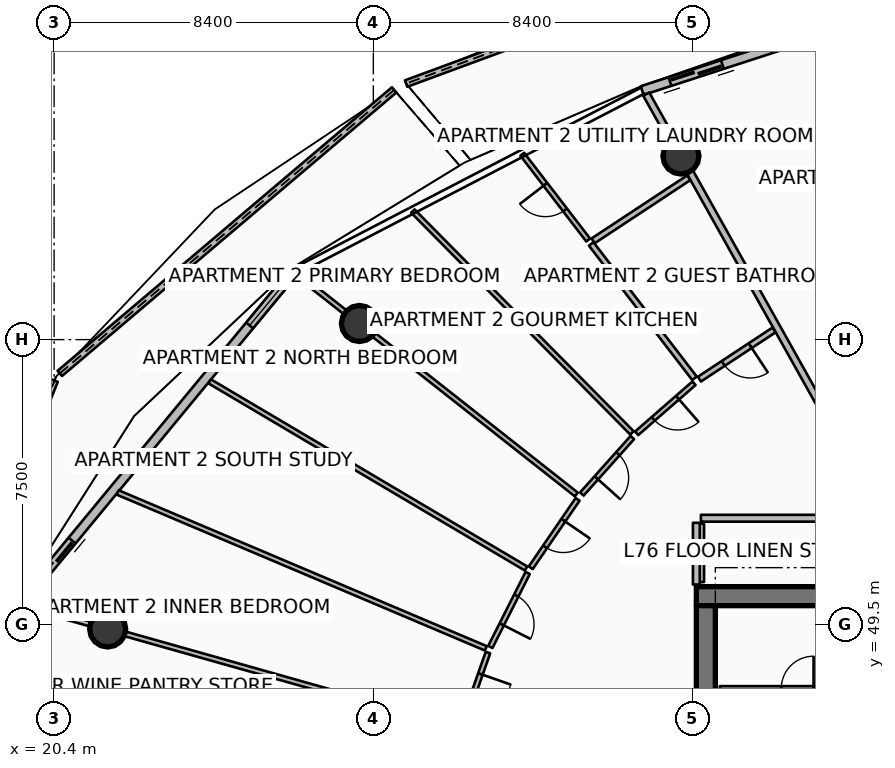
"""IFC4 building model, lengths in metres.
Left out: names, types, materials, properties, quantities, classifications, styles, units other than length and angle.
Written with IfcOpenShell. Run it as: python <this file> out.ifc"""

import sys

from ifc_helpers import new_model, si_unit, direction, frame, frame_2d, origin, origin_2d, place, context, subcontext, project, spatial, polyline, rectangle, circle, outline, extrude, element, fill, save


model = new_model("IFC4")
c1 = context("Model", 3, precision=1e-05, world=origin(), true_north=direction((0.0, 1.0)))
c2 = subcontext(c1, "Body", "Model", "MODEL_VIEW")
j1 = project(units=[si_unit("LENGTHUNIT", "METRE"), si_unit("PLANEANGLEUNIT", "RADIAN")], contexts=[c1])
p1 = place(None, origin())
s1 = spatial("IfcSite", under=j1, at=p1, CompositionType="ELEMENT")
p2 = place(p1, origin())
s2 = spatial("IfcBuilding", under=s1, at=p2, CompositionType="ELEMENT")
p3 = place(p2, frame((0.0, 0.0, 302.15)))
s3 = spatial("IfcBuildingStorey", under=s2, at=p3, CompositionType="ELEMENT", Elevation=302.15)
p4 = place(p3, frame((37.3, 50.25, 0.0), z_axis=(0.0, 0.0, 1.0), x_axis=(1.0, 0.0, 0.0)))
e1 = element("IfcWall", 1, at=p4, inside=s3, PredefinedType="SHEAR", context=c2, shape_type="SweptSolid", body=[
    extrude(rectangle(XDim=9.6, YDim=0.5, at=frame_2d((4.8, 0.0))), origin(), (0.0, 0.0, 1.0), 3.85),
])
p5 = place(p3, frame((37.55, 34.0, 0.0), z_axis=(0.0, 0.0, 1.0), x_axis=(0.0, 1.0, 0.0)))
e2 = element("IfcWall", 2, at=p5, inside=s3, PredefinedType="SHEAR", context=c2, shape_type="SweptSolid", body=[
    extrude(rectangle(XDim=16.0, YDim=0.5, at=frame_2d((8.0, 0.0))), origin(), (0.0, 0.0, 1.0), 3.85),
])
p6 = place(p3, frame((36.895, 61.83, 0.0), z_axis=(0.129626364371, -0.231553621409, 0.964147253314), x_axis=(0.872576151901, 0.488478105071, 0.0)))
e3 = element("IfcColumn", 3, at=p6, inside=s3, PredefinedType="COLUMN", context=c2, shape_type="SweptSolid", body=[
    extrude(circle(Radius=0.475, at=origin_2d()), origin(), (0.0, 0.0, 1.0), 3.579),
])
p7 = place(p3, frame((28.434, 57.425, 0.0), z_axis=(0.226872805026, -0.178910444334, 0.95735039732), x_axis=(0.619218481875, 0.78521874131, 0.0)))
e4 = element("IfcColumn", 4, at=p7, inside=s3, PredefinedType="COLUMN", context=c2, shape_type="SweptSolid", body=[
    extrude(circle(Radius=0.475, at=origin_2d()), origin(), (0.0, 0.0, 1.0), 3.604),
])
p8 = place(p3, frame((21.809, 49.387, 0.0), z_axis=(0.301218130551, -0.085015826673, 0.949757835999), x_axis=(0.271628463208, 0.962402191381, 0.0)))
e5 = element("IfcColumn", 5, at=p8, inside=s3, PredefinedType="COLUMN", context=c2, shape_type="SweptSolid", body=[
    extrude(circle(Radius=0.475, at=origin_2d()), origin(), (0.0, 0.0, 1.0), 3.633),
])
p9 = place(p3, frame((39.618, 67.41, 0.0), z_axis=(0.0, 0.0, 1.0), x_axis=(-0.938191788678, -0.346115829828, 0.0)))
e6 = element("IfcWall", 6, at=p9, inside=s3, PredefinedType="PARAPET", context=c2, shape_type="SweptSolid", body=[
    extrude(outline(polyline([(0.0, 0.0), (10.611, 0.0), (10.611, 1.86), (5.305, 1.798), (0.0, 1.632), (0.0, 0.0)])), frame((0.0, 0.09, 0.0), z_axis=(0.0, -1.0, 0.0), x_axis=(1.0, 0.0, 0.0)), (0.0, 0.0, 1.0), 0.18),
])
p10 = place(p3, frame((29.348, 63.571, 0.0), z_axis=(0.0, 0.0, 1.0), x_axis=(-0.762735629532, -0.646710413896, 0.0)))
e7 = element("IfcWall", 7, at=p10, inside=s3, PredefinedType="PARAPET", context=c2, shape_type="SweptSolid", body=[
    extrude(outline(polyline([(0.0, 0.0), (11.535, 0.0), (11.535, 1.632), (5.768, 1.798), (0.0, 1.86), (0.0, 0.0)])), frame((0.0, 0.09, 0.0), z_axis=(0.0, -1.0, 0.0), x_axis=(1.0, 0.0, 0.0)), (0.0, 0.0, 1.0), 0.18),
])
p11 = place(p3, frame((20.413, 55.922, 0.0), z_axis=(0.0, 0.0, 1.0), x_axis=(-0.374094279698, -0.927390678138, 0.0)))
e8 = element("IfcWall", 8, at=p11, inside=s3, PredefinedType="PARAPET", context=c2, shape_type="SweptSolid", body=[
    extrude(outline(polyline([(0.0, 0.0), (12.075, 0.0), (12.075, 1.233), (6.037, 1.418), (0.0, 1.632), (0.0, 0.0)])), frame((0.0, 0.09, 0.0), z_axis=(0.0, -1.0, 0.0), x_axis=(1.0, 0.0, 0.0)), (0.0, 0.0, 1.0), 0.18),
])
p12 = place(p3, frame((45.142, 66.564, 0.0), z_axis=(0.0, 0.0, 1.0), x_axis=(-0.951055974609, -0.309018661507, 0.0)))
e9 = element("IfcWall", 9, at=p12, inside=s3, PredefinedType="SOLIDWALL", context=c2, shape_type="SweptSolid", body=[
    extrude(rectangle(XDim=9.745, YDim=0.24, at=frame_2d((4.873, 0.0))), origin(), (0.0, 0.0, 1.0), 2.4),
])
p13 = place(p12, frame((7.525, 0.0, 0.0)))
e10 = element("IfcOpeningElement", 10, at=p13, cuts=e9, PredefinedType="OPENING", context=c2, shape_type="SweptSolid", body=[
    extrude(rectangle(XDim=1.45, YDim=2.15, at=frame_2d((0.725, 1.075))), frame((0.0, 0.13, 0.0), z_axis=(0.0, -1.0, 0.0), x_axis=(1.0, 0.0, 0.0)), (0.0, 0.0, 1.0), 0.26),
])
p14 = place(p12, frame((0.28, 0.0, 0.65)))
e11 = element("IfcOpeningElement", 11, at=p14, cuts=e9, PredefinedType="OPENING", context=c2, shape_type="SweptSolid", body=[
    extrude(rectangle(XDim=1.6, YDim=1.5, at=frame_2d((0.8, 0.75))), frame((0.0, 0.13, 0.0), z_axis=(0.0, -1.0, 0.0), x_axis=(1.0, 0.0, 0.0)), (0.0, 0.0, 1.0), 0.26),
])
p15 = place(p3, frame((26.742, 58.822, 0.0), z_axis=(0.0, 0.0, 1.0), x_axis=(-0.636680093065, -0.771128043255, 0.0)))
e12 = element("IfcWall", 12, at=p15, inside=s3, PredefinedType="SOLIDWALL", context=c2, shape_type="SweptSolid", body=[
    extrude(rectangle(XDim=11.438, YDim=0.24, at=frame_2d((5.719, 0.0))), origin(), (0.0, 0.0, 1.0), 2.4),
])
p16 = place(p15, frame((9.218, 0.0, 0.0)))
e13 = element("IfcOpeningElement", 13, at=p16, cuts=e12, PredefinedType="OPENING", context=c2, shape_type="SweptSolid", body=[
    extrude(rectangle(XDim=1.45, YDim=2.15, at=frame_2d((0.725, 1.075))), frame((0.0, 0.13, 0.0), z_axis=(0.0, -1.0, 0.0), x_axis=(1.0, 0.0, 0.0)), (0.0, 0.0, 1.0), 0.26),
])
p17 = place(p15, frame((0.28, 0.0, 0.65)))
e14 = element("IfcOpeningElement", 14, at=p17, cuts=e12, PredefinedType="OPENING", context=c2, shape_type="SweptSolid", body=[
    extrude(rectangle(XDim=1.6, YDim=1.5, at=frame_2d((0.8, 0.75))), frame((0.0, 0.13, 0.0), z_axis=(0.0, -1.0, 0.0), x_axis=(1.0, 0.0, 0.0)), (0.0, 0.0, 1.0), 0.26),
])
p18 = place(p3, frame((37.92, 47.82, 0.0), z_axis=(0.0, 0.0, 1.0), x_axis=(1.0, 0.0, 0.0)))
e15 = element("IfcWall", 15, at=p18, inside=s3, PredefinedType="PARTITIONING", context=c2, shape_type="SweptSolid", body=[
    extrude(rectangle(XDim=4.08, YDim=0.125, at=frame_2d((2.04, 0.0))), origin(), (0.0, 0.0, 1.0), 2.89),
])
p19 = place(p18, frame((1.615, 0.0, 0.0)))
e16 = element("IfcOpeningElement", 16, at=p19, cuts=e15, PredefinedType="OPENING", context=c2, shape_type="SweptSolid", body=[
    extrude(rectangle(XDim=0.85, YDim=2.06, at=frame_2d((0.425, 1.03))), frame((0.0, 0.073, 0.0), z_axis=(0.0, -1.0, 0.0), x_axis=(1.0, 0.0, 0.0)), (0.0, 0.0, 1.0), 0.145),
])
p20 = place(p3, frame((37.44, 50.62, 0.0), z_axis=(0.0, 0.0, 1.0), x_axis=(0.0, 1.0, 0.0)))
e17 = element("IfcWall", 17, at=p20, inside=s3, PredefinedType="PARTITIONING", context=c2, shape_type="SweptSolid", body=[
    extrude(rectangle(XDim=1.54, YDim=0.125, at=frame_2d((0.77, 0.0))), origin(), (0.0, 0.0, 1.0), 2.407),
])
p21 = place(p3, frame((42.178, 52.396, 0.0), z_axis=(0.0, 0.0, 1.0), x_axis=(-0.48862858053, 0.872491896976, 0.0)))
e18 = element("IfcWall", 18, at=p21, inside=s3, PredefinedType="PARTITIONING", context=c2, shape_type="SweptSolid", body=[
    extrude(rectangle(XDim=12.679, YDim=0.18, at=frame_2d((6.34, 0.0))), origin(), (0.0, 0.0, 1.0), 2.407),
])
p22 = place(p3, frame((42.112, 52.3, 0.0), z_axis=(0.0, 0.0, 1.0), x_axis=(-1.0, 0.0, 0.0)))
e19 = element("IfcWall", 19, at=p22, inside=s3, PredefinedType="PARTITIONING", context=c2, shape_type="SweptSolid", body=[
    extrude(rectangle(XDim=4.692, YDim=0.18, at=frame_2d((2.346, 0.0))), origin(), (0.0, 0.0, 1.0), 2.407),
])
p23 = place(p3, frame((37.3, 52.18, 0.0), z_axis=(0.0, 0.0, 1.0), x_axis=(0.0, -1.0, 0.0)))
e20 = element("IfcWall", 20, at=p23, inside=s3, PredefinedType="PARTITIONING", context=c2, shape_type="SweptSolid", body=[
    extrude(rectangle(XDim=1.625, YDim=0.18, at=frame_2d((0.812, 0.0))), origin(), (0.0, 0.0, 1.0), 2.407),
])
p24 = place(p3, frame((39.343, 57.254, 0.0), z_axis=(0.0, 0.0, 1.0), x_axis=(-0.834820417885, -0.550522360929, 0.0)))
e21 = element("IfcWall", 21, at=p24, inside=s3, PredefinedType="PARTITIONING", context=c2, shape_type="SweptSolid", body=[
    extrude(rectangle(XDim=2.35, YDim=0.15, at=frame_2d((1.175, 0.0))), origin(), (0.0, 0.0, 1.0), 2.407),
])
p25 = place(p24, frame((0.75, 0.0, 0.0)))
e22 = element("IfcOpeningElement", 22, at=p25, cuts=e21, PredefinedType="OPENING", context=c2, shape_type="SweptSolid", body=[
    extrude(rectangle(XDim=0.85, YDim=2.06, at=frame_2d((0.425, 1.03))), frame((0.0, 0.085, 0.0), z_axis=(0.0, -1.0, 0.0), x_axis=(1.0, 0.0, 0.0)), (0.0, 0.0, 1.0), 0.17),
])
p26 = place(p3, frame((37.1, 61.259, 0.0), z_axis=(0.0, 0.0, 1.0), x_axis=(-0.834830485099, -0.550507094549, 0.0)))
e23 = element("IfcWall", 23, at=p26, inside=s3, PredefinedType="PARTITIONING", context=c2, shape_type="SweptSolid", body=[
    extrude(rectangle(XDim=3.015, YDim=0.15, at=frame_2d((1.507, 0.0))), origin(), (0.0, 0.0, 1.0), 2.425),
])
p27 = place(p3, frame((37.251, 55.982, 0.0), z_axis=(0.0, 0.0, 1.0), x_axis=(-0.609477935871, 0.792803030826, 0.0)))
e24 = element("IfcWall", 24, at=p27, inside=s3, PredefinedType="PARTITIONING", context=c2, shape_type="SweptSolid", body=[
    extrude(rectangle(XDim=4.46, YDim=0.15, at=frame_2d((2.23, 0.0))), origin(), (0.0, 0.0, 1.0), 2.425),
])
p28 = place(p3, frame((34.454, 59.621, 0.0), z_axis=(0.0, 0.0, 1.0), x_axis=(-0.609524178844, 0.792767478776, 0.0)))
e25 = element("IfcWall", 25, at=p28, inside=s3, PredefinedType="PARTITIONING", context=c2, shape_type="SweptSolid", body=[
    extrude(rectangle(XDim=2.846, YDim=0.125, at=frame_2d((1.423, 0.0))), origin(), (0.0, 0.0, 1.0), 2.89),
])
p29 = place(p28, frame((0.998, 0.0, 0.0)))
e26 = element("IfcOpeningElement", 26, at=p29, cuts=e25, PredefinedType="OPENING", context=c2, shape_type="SweptSolid", body=[
    extrude(rectangle(XDim=0.85, YDim=2.06, at=frame_2d((0.425, 1.03))), frame((0.0, 0.073, 0.0), z_axis=(0.0, -1.0, 0.0), x_axis=(1.0, 0.0, 0.0)), (0.0, 0.0, 1.0), 0.145),
])
p30 = place(p3, frame((35.606, 54.546, 0.0), z_axis=(0.0, 0.0, 1.0), x_axis=(-0.702793317505, 0.711394091113, 0.0)))
e27 = element("IfcWall", 27, at=p30, inside=s3, PredefinedType="PARTITIONING", context=c2, shape_type="SweptSolid", body=[
    extrude(rectangle(XDim=8.204, YDim=0.125, at=frame_2d((4.102, 0.0))), origin(), (0.0, 0.0, 1.0), 2.425),
])
p31 = place(p3, frame((37.238, 55.851, 0.0), z_axis=(0.0, 0.0, 1.0), x_axis=(-0.753512510059, -0.657433568647, 0.0)))
e28 = element("IfcWall", 28, at=p31, inside=s3, PredefinedType="PARTITIONING", context=c2, shape_type="SweptSolid", body=[
    extrude(rectangle(XDim=2.002, YDim=0.125, at=frame_2d((1.001, 0.0))), origin(), (0.0, 0.0, 1.0), 2.89),
])
p32 = place(p31, frame((0.576, 0.0, 0.0)))
e29 = element("IfcOpeningElement", 29, at=p32, cuts=e28, PredefinedType="OPENING", context=c2, shape_type="SweptSolid", body=[
    extrude(rectangle(XDim=0.85, YDim=2.06, at=frame_2d((0.425, 1.03))), frame((0.0, 0.073, 0.0), z_axis=(0.0, -1.0, 0.0), x_axis=(1.0, 0.0, 0.0)), (0.0, 0.0, 1.0), 0.145),
])
p33 = place(p3, frame((35.615, 54.423, 0.0), z_axis=(0.0, 0.0, 1.0), x_axis=(-0.666422295253, -0.745574492851, 0.0)))
e30 = element("IfcWall", 30, at=p33, inside=s3, PredefinedType="PARTITIONING", context=c2, shape_type="SweptSolid", body=[
    extrude(rectangle(XDim=1.992, YDim=0.125, at=frame_2d((0.996, 0.0))), origin(), (0.0, 0.0, 1.0), 2.407),
])
p34 = place(p33, frame((0.571, 0.0, 0.0)))
e31 = element("IfcOpeningElement", 31, at=p34, cuts=e30, PredefinedType="OPENING", context=c2, shape_type="SweptSolid", body=[
    extrude(rectangle(XDim=0.85, YDim=2.06, at=frame_2d((0.425, 1.03))), frame((0.0, 0.073, 0.0), z_axis=(0.0, -1.0, 0.0), x_axis=(1.0, 0.0, 0.0)), (0.0, 0.0, 1.0), 0.145),
])
p35 = place(p3, frame((34.142, 52.925, 0.0), z_axis=(0.0, 0.0, 1.0), x_axis=(-0.785325513659, 0.619083061952, 0.0)))
e32 = element("IfcWall", 32, at=p35, inside=s3, PredefinedType="PARTITIONING", context=c2, shape_type="SweptSolid", body=[
    extrude(rectangle(XDim=9.438, YDim=0.125, at=frame_2d((4.719, 0.0))), origin(), (0.0, 0.0, 1.0), 2.407),
])
p36 = place(p3, frame((32.82, 50.977, 0.0), z_axis=(0.0, 0.0, 1.0), x_axis=(-0.860726523095, 0.509067630517, 0.0)))
e33 = element("IfcWall", 33, at=p36, inside=s3, PredefinedType="PARTITIONING", context=c2, shape_type="SweptSolid", body=[
    extrude(rectangle(XDim=9.675, YDim=0.125, at=frame_2d((4.837, 0.0))), origin(), (0.0, 0.0, 1.0), 2.425),
])
p37 = place(p3, frame((31.76, 48.877, 0.0), z_axis=(0.0, 0.0, 1.0), x_axis=(-0.92084933412, 0.389918586183, 0.0)))
e34 = element("IfcWall", 34, at=p37, inside=s3, PredefinedType="PARTITIONING", context=c2, shape_type="SweptSolid", body=[
    extrude(rectangle(XDim=10.52, YDim=0.125, at=frame_2d((5.26, 0.0))), origin(), (0.0, 0.0, 1.0), 2.425),
])
p38 = place(p3, frame((34.176, 52.797, 0.0), z_axis=(0.0, 0.0, 1.0), x_axis=(-0.565297740474, -0.824886940505, 0.0)))
e35 = element("IfcWall", 35, at=p38, inside=s3, PredefinedType="PARTITIONING", context=c2, shape_type="SweptSolid", body=[
    extrude(rectangle(XDim=2.181, YDim=0.125, at=frame_2d((1.09, 0.0))), origin(), (0.0, 0.0, 1.0), 2.407),
])
p39 = place(p38, frame((0.666, 0.0, 0.0)))
e36 = element("IfcOpeningElement", 36, at=p39, cuts=e35, PredefinedType="OPENING", context=c2, shape_type="SweptSolid", body=[
    extrude(rectangle(XDim=0.85, YDim=2.06, at=frame_2d((0.425, 1.03))), frame((0.0, 0.073, 0.0), z_axis=(0.0, -1.0, 0.0), x_axis=(1.0, 0.0, 0.0)), (0.0, 0.0, 1.0), 0.145),
])
p40 = place(p3, frame((32.861, 50.86, 0.0), z_axis=(0.0, 0.0, 1.0), x_axis=(-0.450479495765, -0.892786774037, 0.0)))
e37 = element("IfcWall", 37, at=p40, inside=s3, PredefinedType="PARTITIONING", context=c2, shape_type="SweptSolid", body=[
    extrude(rectangle(XDim=2.181, YDim=0.125, at=frame_2d((1.09, 0.0))), origin(), (0.0, 0.0, 1.0), 2.89),
])
p41 = place(p40, frame((0.666, 0.0, 0.0)))
e38 = element("IfcOpeningElement", 38, at=p41, cuts=e37, PredefinedType="OPENING", context=c2, shape_type="SweptSolid", body=[
    extrude(rectangle(XDim=0.85, YDim=2.06, at=frame_2d((0.425, 1.03))), frame((0.0, 0.073, 0.0), z_axis=(0.0, -1.0, 0.0), x_axis=(1.0, 0.0, 0.0)), (0.0, 0.0, 1.0), 0.145),
])
p42 = place(p3, frame((31.816, 48.766, 0.0), z_axis=(0.0, 0.0, 1.0), x_axis=(-0.331313530443, -0.943520717602, 0.0)))
e39 = element("IfcWall", 39, at=p42, inside=s3, PredefinedType="PARTITIONING", context=c2, shape_type="SweptSolid", body=[
    extrude(rectangle(XDim=2.043, YDim=0.125, at=frame_2d((1.022, 0.0))), origin(), (0.0, 0.0, 1.0), 2.407),
])
p43 = place(p42, frame((0.597, 0.0, 0.0)))
e40 = element("IfcOpeningElement", 40, at=p43, cuts=e39, PredefinedType="OPENING", context=c2, shape_type="SweptSolid", body=[
    extrude(rectangle(XDim=0.85, YDim=2.06, at=frame_2d((0.425, 1.03))), frame((0.0, 0.073, 0.0), z_axis=(0.0, -1.0, 0.0), x_axis=(1.0, 0.0, 0.0)), (0.0, 0.0, 1.0), 0.145),
])
p44 = place(p3, frame((31.017, 46.79, 0.0), z_axis=(0.0, 0.0, 1.0), x_axis=(-0.962453678557, 0.271445973691, 0.0)))
e41 = element("IfcWall", 41, at=p44, inside=s3, PredefinedType="PARTITIONING", context=c2, shape_type="SweptSolid", body=[
    extrude(rectangle(XDim=11.85, YDim=0.125, at=frame_2d((5.925, 0.0))), origin(), (0.0, 0.0, 1.0), 2.407),
])
p45 = place(p13, origin())
e42 = element("IfcDoor", 42, at=p45, inside=s3, OperationType="DOUBLE_DOOR_SLIDING", PredefinedType="DOOR", context=c2, shape_type="SweptSolid", body=[
    extrude(rectangle(XDim=1.45, YDim=2.15, at=frame_2d((0.725, 1.075))), frame((0.0, 0.025, 0.0), z_axis=(0.0, -1.0, 0.0), x_axis=(1.0, 0.0, 0.0)), (0.0, 0.0, 1.0), 0.05),
])
fill(e10, e42)
p46 = place(p16, origin())
e43 = element("IfcDoor", 43, at=p46, inside=s3, OperationType="DOUBLE_DOOR_SLIDING", PredefinedType="DOOR", context=c2, shape_type="SweptSolid", body=[
    extrude(rectangle(XDim=1.45, YDim=2.15, at=frame_2d((0.725, 1.075))), frame((0.0, 0.025, 0.0), z_axis=(0.0, -1.0, 0.0), x_axis=(1.0, 0.0, 0.0)), (0.0, 0.0, 1.0), 0.05),
])
fill(e13, e43)
p47 = place(p17, origin())
e44 = element("IfcWindow", 44, at=p47, inside=s3, PartitioningType="SINGLE_PANEL", PredefinedType="WINDOW", context=c2, shape_type="SweptSolid", body=[
    extrude(rectangle(XDim=1.6, YDim=1.5, at=frame_2d((0.8, 0.75))), frame((0.0, 0.03, 0.0), z_axis=(0.0, -1.0, 0.0), x_axis=(1.0, 0.0, 0.0)), (0.0, 0.0, 1.0), 0.06),
])
fill(e14, e44)
p48 = place(p19, origin())
e45 = element("IfcDoor", 45, at=p48, inside=s3, OperationType="SINGLE_SWING_RIGHT", PredefinedType="DOOR", context=c2, shape_type="SweptSolid", body=[
    extrude(rectangle(XDim=0.85, YDim=2.06, at=frame_2d((0.425, 1.03))), frame((0.0, 0.025, 0.0), z_axis=(0.0, -1.0, 0.0), x_axis=(1.0, 0.0, 0.0)), (0.0, 0.0, 1.0), 0.05),
])
fill(e16, e45)
p49 = place(p25, origin())
e46 = element("IfcDoor", 46, at=p49, inside=s3, OperationType="SINGLE_SWING_LEFT", PredefinedType="DOOR", context=c2, shape_type="SweptSolid", body=[
    extrude(rectangle(XDim=0.85, YDim=2.06, at=frame_2d((0.425, 1.03))), frame((0.0, 0.025, 0.0), z_axis=(0.0, -1.0, 0.0), x_axis=(1.0, 0.0, 0.0)), (0.0, 0.0, 1.0), 0.05),
])
fill(e22, e46)
p50 = place(p29, origin())
e47 = element("IfcDoor", 47, at=p50, inside=s3, OperationType="SINGLE_SWING_RIGHT", PredefinedType="DOOR", context=c2, shape_type="SweptSolid", body=[
    extrude(rectangle(XDim=0.85, YDim=2.06, at=frame_2d((0.425, 1.03))), frame((0.0, 0.025, 0.0), z_axis=(0.0, -1.0, 0.0), x_axis=(1.0, 0.0, 0.0)), (0.0, 0.0, 1.0), 0.05),
])
fill(e26, e47)
p51 = place(p32, origin())
e48 = element("IfcDoor", 48, at=p51, inside=s3, OperationType="SINGLE_SWING_LEFT", PredefinedType="DOOR", context=c2, shape_type="SweptSolid", body=[
    extrude(rectangle(XDim=0.85, YDim=2.06, at=frame_2d((0.425, 1.03))), frame((0.0, 0.025, 0.0), z_axis=(0.0, -1.0, 0.0), x_axis=(1.0, 0.0, 0.0)), (0.0, 0.0, 1.0), 0.05),
])
fill(e29, e48)
p52 = place(p34, origin())
e49 = element("IfcDoor", 49, at=p52, inside=s3, OperationType="SINGLE_SWING_RIGHT", PredefinedType="DOOR", context=c2, shape_type="SweptSolid", body=[
    extrude(rectangle(XDim=0.85, YDim=2.06, at=frame_2d((0.425, 1.03))), frame((0.0, 0.025, 0.0), z_axis=(0.0, -1.0, 0.0), x_axis=(1.0, 0.0, 0.0)), (0.0, 0.0, 1.0), 0.05),
])
fill(e31, e49)
p53 = place(p39, origin())
e50 = element("IfcDoor", 50, at=p53, inside=s3, OperationType="SINGLE_SWING_LEFT", PredefinedType="DOOR", context=c2, shape_type="SweptSolid", body=[
    extrude(rectangle(XDim=0.85, YDim=2.06, at=frame_2d((0.425, 1.03))), frame((0.0, 0.025, 0.0), z_axis=(0.0, -1.0, 0.0), x_axis=(1.0, 0.0, 0.0)), (0.0, 0.0, 1.0), 0.05),
])
fill(e36, e50)
p54 = place(p41, origin())
e51 = element("IfcDoor", 51, at=p54, inside=s3, OperationType="SINGLE_SWING_RIGHT", PredefinedType="DOOR", context=c2, shape_type="SweptSolid", body=[
    extrude(rectangle(XDim=0.85, YDim=2.06, at=frame_2d((0.425, 1.03))), frame((0.0, 0.025, 0.0), z_axis=(0.0, -1.0, 0.0), x_axis=(1.0, 0.0, 0.0)), (0.0, 0.0, 1.0), 0.05),
])
fill(e38, e51)
p55 = place(p43, origin())
e52 = element("IfcDoor", 52, at=p55, inside=s3, OperationType="SINGLE_SWING_LEFT", PredefinedType="DOOR", context=c2, shape_type="SweptSolid", body=[
    extrude(rectangle(XDim=0.85, YDim=2.06, at=frame_2d((0.425, 1.03))), frame((0.0, 0.025, 0.0), z_axis=(0.0, -1.0, 0.0), x_axis=(1.0, 0.0, 0.0)), (0.0, 0.0, 1.0), 0.05),
])
fill(e40, e52)
save(model, sys.argv[1])
